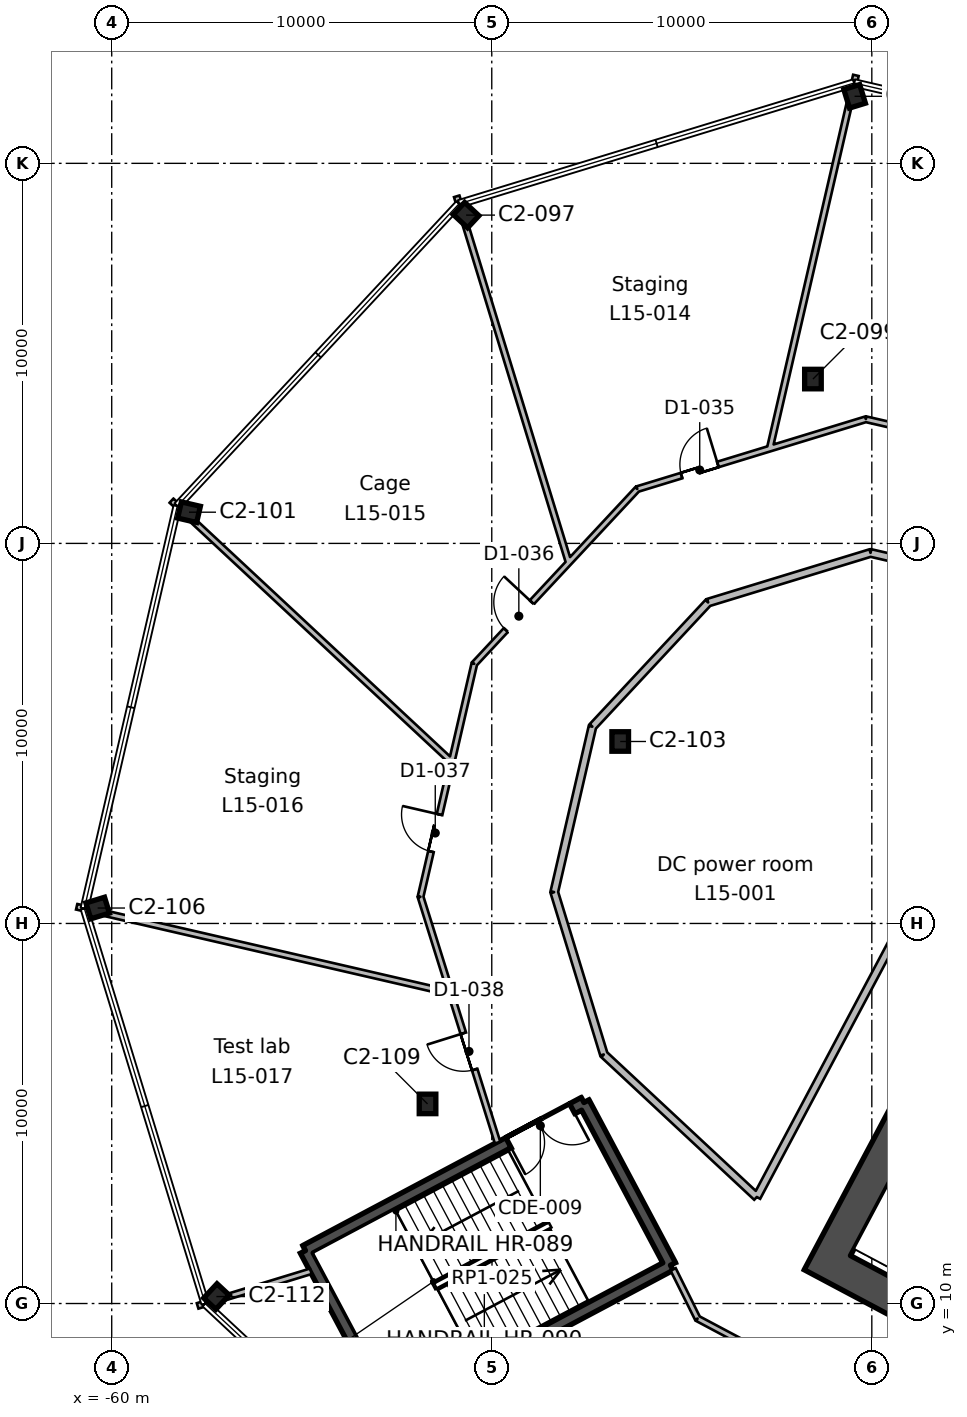
"""IFC4 building model, lengths in metres.
Left out: names, types, materials, properties, quantities, classifications, styles, units other than length and angle.
Written with IfcOpenShell. Run it as: python <this file> out.ifc"""

import sys

from ifc_helpers import new_model, si_unit, direction, frame, frame_2d, origin, origin_2d, place, context, subcontext, project, spatial, rectangle, i_section, extrude, element, fill, save


model = new_model("IFC4")
c1 = context("Model", 3, precision=1e-05, world=origin(), true_north=direction((0.0, 1.0)))
c2 = subcontext(c1, "Body", "Model", "MODEL_VIEW")
j1 = project(units=[si_unit("LENGTHUNIT", "METRE"), si_unit("PLANEANGLEUNIT", "RADIAN")], contexts=[c1])
p1 = place(None, origin())
s1 = spatial("IfcSite", under=j1, at=p1, CompositionType="ELEMENT")
p2 = place(p1, origin())
s2 = spatial("IfcBuilding", under=s1, at=p2, CompositionType="ELEMENT")
p3 = place(p2, frame((0.0, 0.0, 80.0)))
s3 = spatial("IfcBuildingStorey", under=s2, at=p3, CompositionType="ELEMENT", Elevation=80.0)
for number, where, z_axis, x_axis in (
    (1, (-57.245, 10.183, 0.0), (0.0, 0.0, 1.0), (0.731, -0.682, 0.0)),
    (2, (-51.69, 15.252, 0.0), (0.0, 0.0, 1.0), (1.0, 0.0, 0.0)),
    (3, (-60.37, 20.406, 0.0), (0.0, 0.0, 1.0), (0.292, -0.956, 0.0)),
    (4, (-46.62, 24.788, 0.0), (0.0, 0.0, 1.0), (1.0, 0.0, 0.0)),
    (5, (-57.966, 30.821, 0.0), (0.0, 0.0, 1.0), (-0.225, -0.974, 0.0)),
    (6, (-41.549, 34.324, 0.0), (0.0, 0.0, 1.0), (1.0, 0.0, 0.0)),
    (7, (-50.675, 38.638, 0.0), (0.0, 0.0, 1.0), (-0.682, -0.731, 0.0)),
    (8, (-40.453, 41.764, 0.0), (0.0, 0.0, 1.0), (-0.956, -0.292, 0.0)),
):
    element("IfcColumn", number, at=place(p3, frame(where, z_axis=z_axis, x_axis=x_axis)), inside=s3, PredefinedType="COLUMN", context=c2, shape_type="SweptSolid", body=[
        extrude(i_section(OverallWidth=0.437, OverallDepth=0.513, WebThickness=0.061, FlangeThickness=0.097, FilletRadius=0.015, at=origin_2d()), origin(), (0.0, 0.0, 1.0), 4.6),
    ])
p4 = place(p3, frame((-31.992, 28.336, 0.0), z_axis=(0.0, 0.0, 1.0), x_axis=(-0.46947084998, -0.882947971864, 0.0)))
e9 = element("IfcWall", 9, at=p4, inside=s3, PredefinedType="SHEAR", context=c2, shape_type="SweptSolid", body=[
    extrude(rectangle(XDim=20.0, YDim=0.9, at=frame_2d((10.0, 0.0))), origin(), (0.0, 0.0, 1.0), 4.6),
])
p5 = place(p4, frame((10.6, 0.0, 0.0)))
e10 = element("IfcOpeningElement", 10, at=p5, cuts=e9, PredefinedType="OPENING", context=c2, shape_type="SweptSolid", body=[
    extrude(rectangle(XDim=2.4, YDim=2.4, at=frame_2d((1.2, 1.2))), frame((0.0, 0.46, 0.0), z_axis=(0.0, -1.0, 0.0), x_axis=(1.0, 0.0, 0.0)), (0.0, 0.0, 1.0), 0.92),
])
p6 = place(p3, frame((-22.937, 1.38, 0.0), z_axis=(0.0, 0.0, 1.0), x_axis=(-0.88295276571, 0.46946183394, 0.0)))
e11 = element("IfcWall", 11, at=p6, inside=s3, PredefinedType="SHEAR", context=c2, shape_type="SweptSolid", body=[
    extrude(rectangle(XDim=20.2, YDim=0.9, at=frame_2d((10.1, 0.0))), origin(), (0.0, 0.0, 1.0), 4.6),
])
p7 = place(p3, frame((-47.574, 15.29, 0.0), z_axis=(0.0, 0.0, 1.0), x_axis=(0.469443498566, -0.882962514297, 0.0)))
e12 = element("IfcWall", 12, at=p7, inside=s3, PredefinedType="SHEAR", context=c2, shape_type="SweptSolid", body=[
    extrude(rectangle(XDim=4.85, YDim=0.3, at=frame_2d((2.425, 0.0))), origin(), (0.0, 0.0, 1.0), 4.6),
])
p8 = place(p3, frame((-45.297, 11.007, 0.0), z_axis=(0.0, 0.0, 1.0), x_axis=(-0.882951519127, -0.469464178475, 0.0)))
e13 = element("IfcWall", 13, at=p8, inside=s3, PredefinedType="SHEAR", context=c2, shape_type="SweptSolid", body=[
    extrude(rectangle(XDim=8.3, YDim=0.3, at=frame_2d((4.15, 0.0))), origin(), (0.0, 0.0, 1.0), 4.6),
])
p9 = place(p3, frame((-52.626, 7.111, 0.0), z_axis=(0.0, 0.0, 1.0), x_axis=(-0.469464364128, 0.882951420416, 0.0)))
e14 = element("IfcWall", 14, at=p9, inside=s3, PredefinedType="SHEAR", context=c2, shape_type="SweptSolid", body=[
    extrude(rectangle(XDim=4.85, YDim=0.3, at=frame_2d((2.425, 0.0))), origin(), (0.0, 0.0, 1.0), 4.6),
])
p10 = place(p3, frame((-54.903, 11.393, 0.0), z_axis=(0.0, 0.0, 1.0), x_axis=(0.882939326045, 0.469487110071, 0.0)))
e15 = element("IfcWall", 15, at=p10, inside=s3, PredefinedType="SHEAR", context=c2, shape_type="SweptSolid", body=[
    extrude(rectangle(XDim=8.3, YDim=0.3, at=frame_2d((4.15, 0.0))), origin(), (0.0, 0.0, 1.0), 4.6),
])
p11 = place(p10, frame((6.05, 0.0, 0.0)))
e16 = element("IfcOpeningElement", 16, at=p11, cuts=e15, PredefinedType="OPENING", context=c2, shape_type="SweptSolid", body=[
    extrude(rectangle(XDim=1.9, YDim=2.1, at=frame_2d((0.95, 1.05))), frame((0.0, 0.16, 0.0), z_axis=(0.0, -1.0, 0.0), x_axis=(1.0, 0.0, 0.0)), (0.0, 0.0, 1.0), 0.32),
])
p12 = place(p3, frame((-51.08, 18.168, 0.0), z_axis=(0.0, 0.0, 1.0), x_axis=(-0.974375306075, 0.224928350615, 0.0)))
e17 = element("IfcWall", 17, at=p12, inside=s3, PredefinedType="PARTITIONING", context=c2, shape_type="SweptSolid", body=[
    extrude(rectangle(XDim=10.101, YDim=0.15, at=frame_2d((5.05, 0.0))), origin(), (0.0, 0.0, 1.0), 4.2),
])
p13 = place(p3, frame((-58.427, 31.125, 0.0), z_axis=(0.0, 0.0, 1.0), x_axis=(0.731473963822, -0.681869371838, 0.0)))
e18 = element("IfcWall", 18, at=p13, inside=s3, PredefinedType="PARTITIONING", context=c2, shape_type="SweptSolid", body=[
    extrude(rectangle(XDim=10.08, YDim=0.15, at=frame_2d((5.04, 0.0))), origin(), (0.0, 0.0, 1.0), 4.2),
])
p14 = place(p3, frame((-54.761, 10.848, 0.0), z_axis=(0.0, 0.0, 1.0), x_axis=(-0.956301064033, -0.29238378021, 0.0)))
e19 = element("IfcWall", 19, at=p14, inside=s3, PredefinedType="PARTITIONING", context=c2, shape_type="SweptSolid", body=[
    extrude(rectangle(XDim=3.115, YDim=0.15, at=frame_2d((1.558, 0.0))), origin(), (0.0, 0.0, 1.0), 4.2),
])
p15 = place(p3, frame((-51.041, 24.311, 0.0), z_axis=(0.0, 0.0, 1.0), x_axis=(-0.224893203367, -0.974383418927, 0.0)))
e20 = element("IfcWall", 20, at=p15, inside=s3, PredefinedType="PARTITIONING", context=c2, shape_type="SweptSolid", body=[
    extrude(rectangle(XDim=3.704, YDim=0.15, at=frame_2d((1.852, 0.0))), origin(), (0.0, 0.0, 1.0), 4.2),
])
p16 = place(p15, frame((1.482, 0.0, 0.0)))
e21 = element("IfcOpeningElement", 21, at=p16, cuts=e20, PredefinedType="OPENING", context=c2, shape_type="SweptSolid", body=[
    extrude(rectangle(XDim=1.0, YDim=2.1, at=frame_2d((0.5, 1.05))), frame((0.0, 0.085, 0.0), z_axis=(0.0, -1.0, 0.0), x_axis=(1.0, 0.0, 0.0)), (0.0, 0.0, 1.0), 0.17),
])
p17 = place(p3, frame((-51.874, 20.702, 0.0), z_axis=(0.0, 0.0, 1.0), x_axis=(0.299019355328, -0.954247046178, 0.0)))
e22 = element("IfcWall", 22, at=p17, inside=s3, PredefinedType="PARTITIONING", context=c2, shape_type="SweptSolid", body=[
    extrude(rectangle(XDim=2.595, YDim=0.15, at=frame_2d((1.298, 0.0))), origin(), (0.0, 0.0, 1.0), 4.2),
])
p18 = place(p3, frame((-49.847, 14.234, 0.0), z_axis=(0.0, 0.0, 1.0), x_axis=(-0.29896287329, 0.954264743346, 0.0)))
e23 = element("IfcWall", 23, at=p18, inside=s3, PredefinedType="PARTITIONING", context=c2, shape_type="SweptSolid", body=[
    extrude(rectangle(XDim=4.183, YDim=0.15, at=frame_2d((2.091, 0.0))), origin(), (0.0, 0.0, 1.0), 4.2),
])
p19 = place(p18, frame((2.015, 0.0, 0.0)))
e24 = element("IfcOpeningElement", 24, at=p19, cuts=e23, PredefinedType="OPENING", context=c2, shape_type="SweptSolid", body=[
    extrude(rectangle(XDim=1.0, YDim=2.1, at=frame_2d((0.5, 1.05))), frame((0.0, 0.085, 0.0), z_axis=(0.0, -1.0, 0.0), x_axis=(1.0, 0.0, 0.0)), (0.0, 0.0, 1.0), 0.17),
])
p20 = place(p3, frame((-47.933, 29.538, 0.0), z_axis=(0.0, 0.0, 1.0), x_axis=(-0.682088017664, -0.731270084277, 0.0)))
e25 = element("IfcWall", 25, at=p20, inside=s3, PredefinedType="PARTITIONING", context=c2, shape_type="SweptSolid", body=[
    extrude(rectangle(XDim=3.703, YDim=0.15, at=frame_2d((1.852, 0.0))), origin(), (0.0, 0.0, 1.0), 4.2),
])
p21 = place(p20, frame((1.486, 0.0, 0.0)))
e26 = element("IfcOpeningElement", 26, at=p21, cuts=e25, PredefinedType="OPENING", context=c2, shape_type="SweptSolid", body=[
    extrude(rectangle(XDim=1.0, YDim=2.1, at=frame_2d((0.5, 1.05))), frame((0.0, 0.085, 0.0), z_axis=(0.0, -1.0, 0.0), x_axis=(1.0, 0.0, 0.0)), (0.0, 0.0, 1.0), 0.17),
])
p22 = place(p3, frame((-50.459, 26.83, 0.0), z_axis=(0.0, 0.0, 1.0), x_axis=(-0.225121568864, -0.974330682691, 0.0)))
e27 = element("IfcWall", 27, at=p22, inside=s3, PredefinedType="PARTITIONING", context=c2, shape_type="SweptSolid", body=[
    extrude(rectangle(XDim=2.585, YDim=0.15, at=frame_2d((1.293, 0.0))), origin(), (0.0, 0.0, 1.0), 4.2),
])
p23 = place(p3, frame((-50.922, 39.133, 0.0), z_axis=(0.0, 0.0, 1.0), x_axis=(0.292463432429, -0.956276707178, 0.0)))
e28 = element("IfcWall", 28, at=p23, inside=s3, PredefinedType="PARTITIONING", context=c2, shape_type="SweptSolid", body=[
    extrude(rectangle(XDim=10.08, YDim=0.15, at=frame_2d((5.04, 0.0))), origin(), (0.0, 0.0, 1.0), 4.2),
])
p24 = place(p3, frame((-48.138, 21.768, 0.0), z_axis=(0.0, 0.0, 1.0), x_axis=(0.224910471472, 0.974379433189, 0.0)))
e29 = element("IfcWall", 29, at=p24, inside=s3, PredefinedType="PARTITIONING", context=c2, shape_type="SweptSolid", body=[
    extrude(rectangle(XDim=3.499, YDim=0.2, at=frame_2d((1.749, 0.0))), origin(), (0.0, 0.0, 1.0), 4.2),
])
p25 = place(p3, frame((-47.351, 25.177, 0.0), z_axis=(0.0, 0.0, 1.0), x_axis=(0.681950982626, 0.731397878925, 0.0)))
e30 = element("IfcWall", 30, at=p25, inside=s3, PredefinedType="PARTITIONING", context=c2, shape_type="SweptSolid", body=[
    extrude(rectangle(XDim=2.464, YDim=0.2, at=frame_2d((1.232, 0.0))), origin(), (0.0, 0.0, 1.0), 4.2),
])
p26 = place(p3, frame((-43.026, 12.802, 0.0), z_axis=(0.0, 0.0, 1.0), x_axis=(-0.731412266015, 0.68193555203, 0.0)))
e31 = element("IfcWall", 31, at=p26, inside=s3, PredefinedType="PARTITIONING", context=c2, shape_type="SweptSolid", body=[
    extrude(rectangle(XDim=5.502, YDim=0.2, at=frame_2d((2.751, 0.0))), origin(), (0.0, 0.0, 1.0), 4.2),
])
p27 = place(p3, frame((-47.05, 16.554, 0.0), z_axis=(0.0, 0.0, 1.0), x_axis=(-0.292399072869, 0.956296388253, 0.0)))
e32 = element("IfcWall", 32, at=p27, inside=s3, PredefinedType="PARTITIONING", context=c2, shape_type="SweptSolid", body=[
    extrude(rectangle(XDim=4.466, YDim=0.2, at=frame_2d((2.233, 0.0))), origin(), (0.0, 0.0, 1.0), 4.2),
])
p28 = place(p3, frame((-48.356, 20.825, 0.0), z_axis=(0.0, 0.0, 1.0), x_axis=(0.225227894395, 0.974306109796, 0.0)))
e33 = element("IfcWall", 33, at=p28, inside=s3, PredefinedType="PARTITIONING", context=c2, shape_type="SweptSolid", body=[
    extrude(rectangle(XDim=0.968, YDim=0.2, at=frame_2d((0.484, 0.0))), origin(), (0.0, 0.0, 1.0), 4.2),
])
p29 = place(p3, frame((-42.653, 32.504, 0.0), z_axis=(0.0, 0.0, 1.0), x_axis=(-0.95632425254, -0.292307926687, 0.0)))
e34 = element("IfcWall", 34, at=p29, inside=s3, PredefinedType="PARTITIONING", context=c2, shape_type="SweptSolid", body=[
    extrude(rectangle(XDim=3.677, YDim=0.15, at=frame_2d((1.839, 0.0))), origin(), (0.0, 0.0, 1.0), 4.2),
])
p30 = place(p29, frame((1.461, 0.0, 0.0)))
e35 = element("IfcOpeningElement", 35, at=p30, cuts=e34, PredefinedType="OPENING", context=c2, shape_type="SweptSolid", body=[
    extrude(rectangle(XDim=1.0, YDim=2.1, at=frame_2d((0.5, 1.05))), frame((0.0, 0.085, 0.0), z_axis=(0.0, -1.0, 0.0), x_axis=(1.0, 0.0, 0.0)), (0.0, 0.0, 1.0), 0.17),
])
p31 = place(p3, frame((-46.17, 31.429, 0.0), z_axis=(0.0, 0.0, 1.0), x_axis=(-0.68198172509, -0.731369213628, 0.0)))
e36 = element("IfcWall", 36, at=p31, inside=s3, PredefinedType="PARTITIONING", context=c2, shape_type="SweptSolid", body=[
    extrude(rectangle(XDim=2.585, YDim=0.15, at=frame_2d((1.293, 0.0))), origin(), (0.0, 0.0, 1.0), 4.2),
])
p32 = place(p3, frame((-40.034, 29.749, 0.0), z_axis=(0.0, 0.0, 1.0), x_axis=(-0.956357512161, -0.29219909126, 0.0)))
e37 = element("IfcWall", 37, at=p32, inside=s3, PredefinedType="PARTITIONING", context=c2, shape_type="SweptSolid", body=[
    extrude(rectangle(XDim=4.466, YDim=0.2, at=frame_2d((2.233, 0.0))), origin(), (0.0, 0.0, 1.0), 4.2),
])
p33 = place(p3, frame((-44.305, 28.444, 0.0), z_axis=(0.0, 0.0, 1.0), x_axis=(-0.681931663517, -0.731415891469, 0.0)))
e38 = element("IfcWall", 38, at=p33, inside=s3, PredefinedType="PARTITIONING", context=c2, shape_type="SweptSolid", body=[
    extrude(rectangle(XDim=2.003, YDim=0.2, at=frame_2d((1.001, 0.0))), origin(), (0.0, 0.0, 1.0), 4.2),
])
p34 = place(p3, frame((-13.6, -6.869, 0.0), z_axis=(0.0, 0.0, 1.0), x_axis=(-0.88295406426, 0.469459391648, 0.0)))
e39 = element("IfcWall", 39, at=p34, inside=s3, PredefinedType="PARTITIONING", context=c2, shape_type="SweptSolid", body=[
    extrude(rectangle(XDim=35.091, YDim=0.15, at=frame_2d((17.545, 0.0))), origin(), (0.0, 0.0, 1.0), 4.2),
])
p35 = place(p34, frame((20.45, 0.0, 0.0)))
e40 = element("IfcOpeningElement", 40, at=p35, cuts=e39, PredefinedType="OPENING", context=c2, shape_type="SweptSolid", body=[
    extrude(rectangle(XDim=1.0, YDim=2.1, at=frame_2d((0.5, 1.05))), frame((0.0, 0.085, 0.0), z_axis=(0.0, -1.0, 0.0), x_axis=(1.0, 0.0, 0.0)), (0.0, 0.0, 1.0), 0.17),
])
p36 = place(p34, frame((17.05, 0.0, 0.0)))
e41 = element("IfcOpeningElement", 41, at=p36, cuts=e39, PredefinedType="OPENING", context=c2, shape_type="SweptSolid", body=[
    extrude(rectangle(XDim=1.0, YDim=2.1, at=frame_2d((0.5, 1.05))), frame((0.0, 0.085, 0.0), z_axis=(0.0, -1.0, 0.0), x_axis=(1.0, 0.0, 0.0)), (0.0, 0.0, 1.0), 0.17),
])
p37 = place(p3, frame((-44.584, 9.605, 0.0), z_axis=(0.0, 0.0, 1.0), x_axis=(-0.445453249083, 0.895305200968, 0.0)))
e42 = element("IfcWall", 42, at=p37, inside=s3, PredefinedType="PARTITIONING", context=c2, shape_type="SweptSolid", body=[
    extrude(rectangle(XDim=1.443, YDim=0.15, at=frame_2d((0.722, 0.0))), origin(), (0.0, 0.0, 1.0), 4.2),
])
p38 = place(p3, frame((-39.826, 18.82, 0.0), z_axis=(0.0, 0.0, 1.0), x_axis=(-0.469481685648, -0.882942210363, 0.0)))
e43 = element("IfcWall", 43, at=p38, inside=s3, PredefinedType="PARTITIONING", context=c2, shape_type="SweptSolid", body=[
    extrude(rectangle(XDim=6.816, YDim=0.2, at=frame_2d((3.408, 0.0))), origin(), (0.0, 0.0, 1.0), 4.2),
])
p39 = place(p3, frame((-40.419, 42.315, 0.0), z_axis=(0.0, 0.0, 1.0), x_axis=(-0.224924959868, -0.974376088802, 0.0)))
e44 = element("IfcWall", 44, at=p39, inside=s3, PredefinedType="PARTITIONING", context=c2, shape_type="SweptSolid", body=[
    extrude(rectangle(XDim=10.079, YDim=0.15, at=frame_2d((5.04, 0.0))), origin(), (0.0, 0.0, 1.0), 4.2),
])
p40 = place(p3, frame((-40.156, 33.267, 0.0), z_axis=(0.0, 0.0, 1.0), x_axis=(-0.956331245239, -0.292285048164, 0.0)))
e45 = element("IfcWall", 45, at=p40, inside=s3, PredefinedType="PARTITIONING", context=c2, shape_type="SweptSolid", body=[
    extrude(rectangle(XDim=2.611, YDim=0.15, at=frame_2d((1.306, 0.0))), origin(), (0.0, 0.0, 1.0), 4.2),
])
p41 = place(p3, frame((-40.157, 33.267, 0.0), z_axis=(0.0, 0.0, 1.0), x_axis=(0.974407195754, -0.224790161846, 0.0)))
e46 = element("IfcWall", 46, at=p41, inside=s3, PredefinedType="PARTITIONING", context=c2, shape_type="SweptSolid", body=[
    extrude(rectangle(XDim=5.143, YDim=0.15, at=frame_2d((2.571, 0.0))), origin(), (0.0, 0.0, 1.0), 4.2),
])
p42 = place(p41, frame((2.05, 0.0, 0.0)))
e47 = element("IfcOpeningElement", 47, at=p42, cuts=e46, PredefinedType="OPENING", context=c2, shape_type="SweptSolid", body=[
    extrude(rectangle(XDim=1.0, YDim=2.1, at=frame_2d((0.5, 1.05))), frame((0.0, 0.085, 0.0), z_axis=(0.0, -1.0, 0.0), x_axis=(1.0, 0.0, 0.0)), (0.0, 0.0, 1.0), 0.17),
])
p43 = place(p3, frame((-34.673, 28.512, 0.0), z_axis=(0.0, 0.0, 1.0), x_axis=(-0.974393439342, 0.224849784003, 0.0)))
e48 = element("IfcWall", 48, at=p43, inside=s3, PredefinedType="PARTITIONING", context=c2, shape_type="SweptSolid", body=[
    extrude(rectangle(XDim=5.502, YDim=0.2, at=frame_2d((2.751, 0.0))), origin(), (0.0, 0.0, 1.0), 4.2),
])
p44 = place(p3, frame((-34.673, 28.512, 0.0), z_axis=(0.0, 0.0, 1.0), x_axis=(-0.469440333182, -0.882964197226, 0.0)))
e49 = element("IfcWall", 49, at=p44, inside=s3, PredefinedType="PARTITIONING", context=c2, shape_type="SweptSolid", body=[
    extrude(rectangle(XDim=10.977, YDim=0.2, at=frame_2d((5.488, 0.0))), origin(), (0.0, 0.0, 1.0), 4.2),
])
p45 = place(p44, frame((4.95, 0.0, 0.0)))
e50 = element("IfcOpeningElement", 50, at=p45, cuts=e49, PredefinedType="OPENING", context=c2, shape_type="SweptSolid", body=[
    extrude(rectangle(XDim=1.0, YDim=2.1, at=frame_2d((0.5, 1.05))), frame((0.0, 0.11, 0.0), z_axis=(0.0, -1.0, 0.0), x_axis=(1.0, 0.0, 0.0)), (0.0, 0.0, 1.0), 0.22),
])
p46 = place(p11, frame((1.9, 0.0, 0.0), z_axis=(0.0, 0.0, 1.0), x_axis=(-1.0, 0.0, 0.0)))
e51 = element("IfcDoor", 51, at=p46, inside=s3, OperationType="DOUBLE_DOOR_SINGLE_SWING", PredefinedType="DOOR", context=c2, shape_type="SweptSolid", body=[
    extrude(rectangle(XDim=1.9, YDim=2.1, at=frame_2d((0.95, 1.05))), frame((0.0, 0.025, 0.0), z_axis=(0.0, -1.0, 0.0), x_axis=(1.0, 0.0, 0.0)), (0.0, 0.0, 1.0), 0.05),
])
fill(e16, e51)
p47 = place(p30, frame((1.0, 0.0, 0.0), z_axis=(0.0, 0.0, 1.0), x_axis=(-1.0, 0.0, 0.0)))
e52 = element("IfcDoor", 52, at=p47, inside=s3, OperationType="SINGLE_SWING_RIGHT", PredefinedType="DOOR", context=c2, shape_type="SweptSolid", body=[
    extrude(rectangle(XDim=1.0, YDim=2.1, at=frame_2d((0.5, 1.05))), frame((0.0, 0.025, 0.0), z_axis=(0.0, -1.0, 0.0), x_axis=(1.0, 0.0, 0.0)), (0.0, 0.0, 1.0), 0.05),
])
fill(e35, e52)
p48 = place(p21, frame((1.0, 0.0, 0.0), z_axis=(0.0, 0.0, 1.0), x_axis=(-1.0, 0.0, 0.0)))
e53 = element("IfcDoor", 53, at=p48, inside=s3, OperationType="SINGLE_SWING_RIGHT", PredefinedType="DOOR", context=c2, shape_type="SweptSolid", body=[
    extrude(rectangle(XDim=1.0, YDim=2.1, at=frame_2d((0.5, 1.05))), frame((0.0, 0.025, 0.0), z_axis=(0.0, -1.0, 0.0), x_axis=(1.0, 0.0, 0.0)), (0.0, 0.0, 1.0), 0.05),
])
fill(e26, e53)
p49 = place(p16, frame((1.0, 0.0, 0.0), z_axis=(0.0, 0.0, 1.0), x_axis=(-1.0, 0.0, 0.0)))
e54 = element("IfcDoor", 54, at=p49, inside=s3, OperationType="SINGLE_SWING_RIGHT", PredefinedType="DOOR", context=c2, shape_type="SweptSolid", body=[
    extrude(rectangle(XDim=1.0, YDim=2.1, at=frame_2d((0.5, 1.05))), frame((0.0, 0.025, 0.0), z_axis=(0.0, -1.0, 0.0), x_axis=(1.0, 0.0, 0.0)), (0.0, 0.0, 1.0), 0.05),
])
fill(e21, e54)
p50 = place(p19, origin())
e55 = element("IfcDoor", 55, at=p50, inside=s3, OperationType="SINGLE_SWING_RIGHT", PredefinedType="DOOR", context=c2, shape_type="SweptSolid", body=[
    extrude(rectangle(XDim=1.0, YDim=2.1, at=frame_2d((0.5, 1.05))), frame((0.0, 0.025, 0.0), z_axis=(0.0, -1.0, 0.0), x_axis=(1.0, 0.0, 0.0)), (0.0, 0.0, 1.0), 0.05),
])
fill(e24, e55)
save(model, sys.argv[1])
